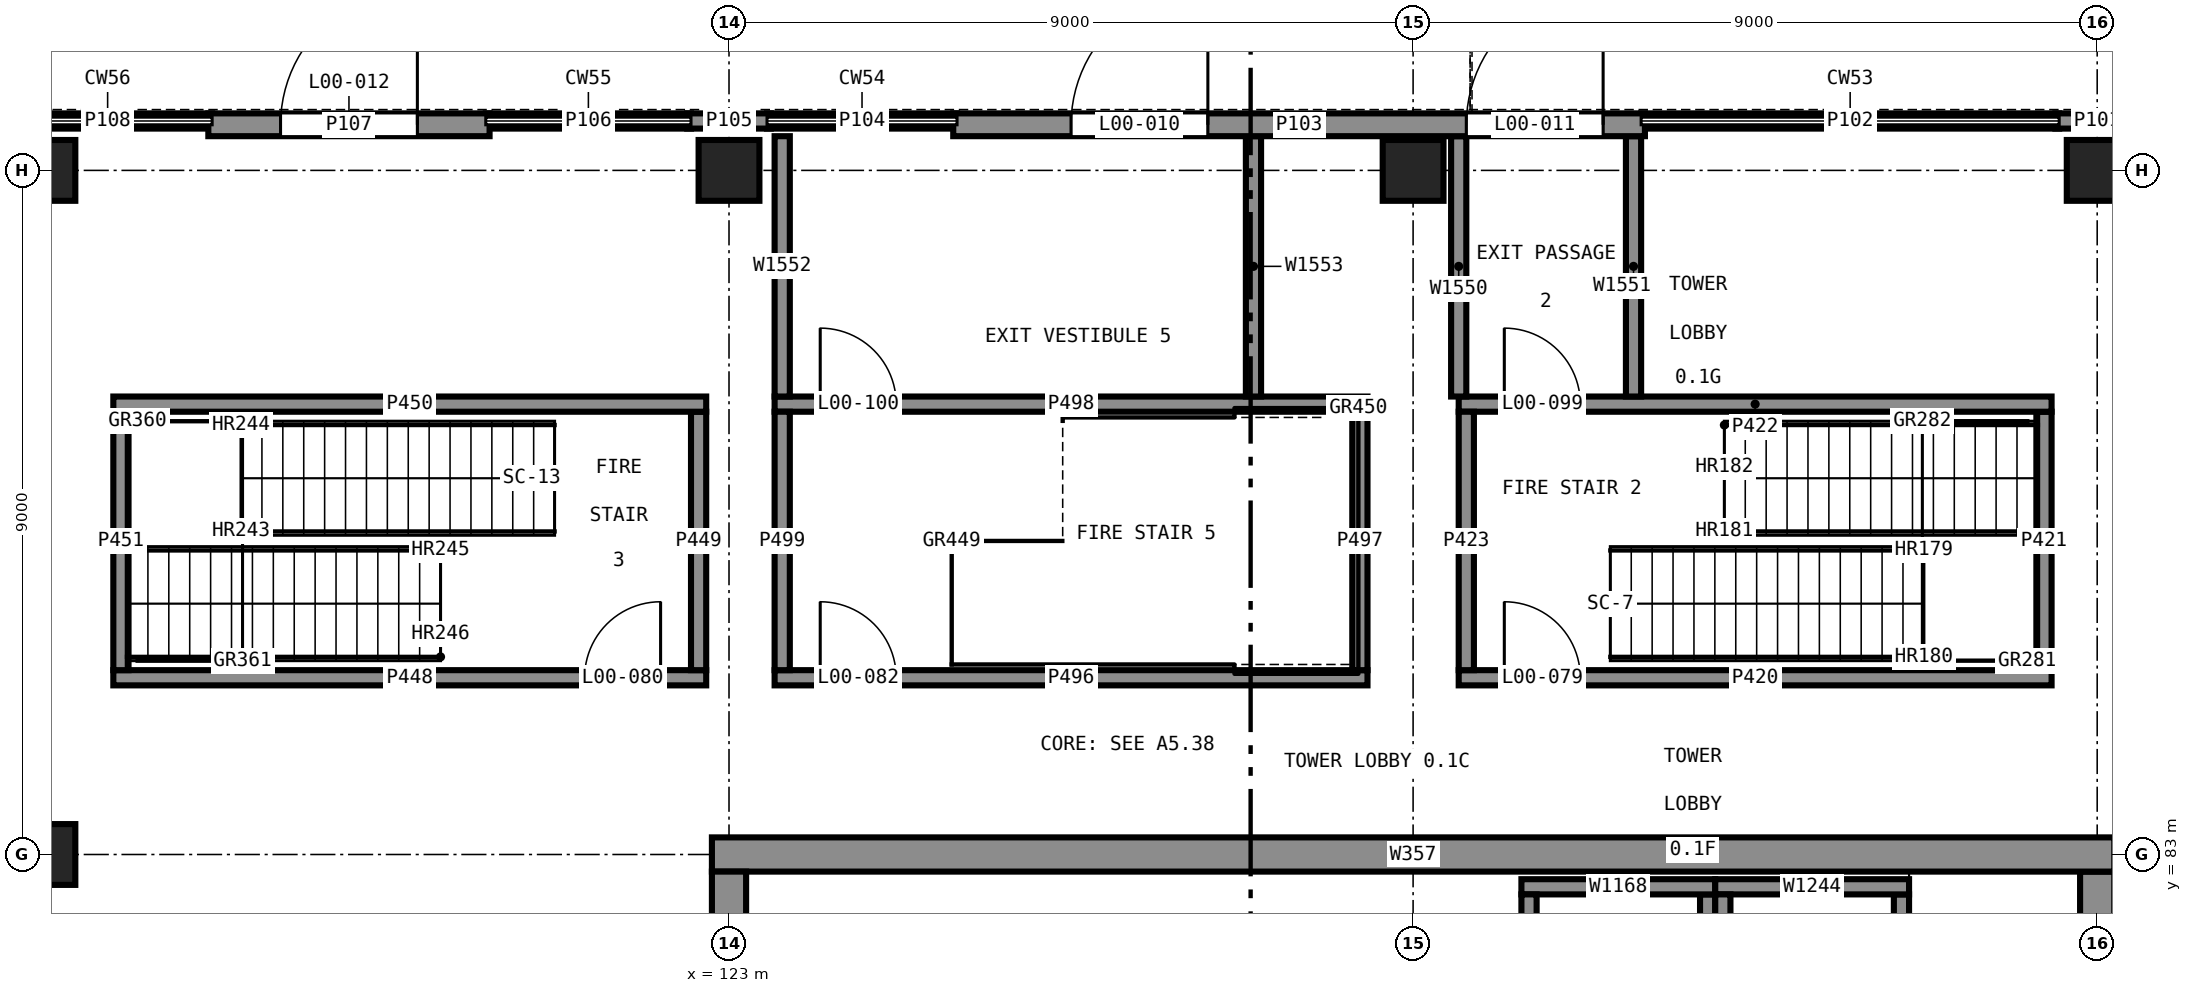
"""IFC4 building model, lengths in metres.
Left out: names, types, materials, properties, quantities, classifications, styles, units other than length and angle.
Written with IfcOpenShell. Run it as: python <this file> out.ifc"""

import sys

from ifc_helpers import new_model, si_unit, direction, frame, frame_2d, origin, origin_2d, place, context, subcontext, project, spatial, rectangle, extrude, element, fill, save


model = new_model("IFC4")
c1 = context("Model", 3, precision=1e-05, world=origin(), true_north=direction((0.0, 1.0)))
c2 = subcontext(c1, "Body", "Model", "MODEL_VIEW")
j1 = project(units=[si_unit("LENGTHUNIT", "METRE"), si_unit("PLANEANGLEUNIT", "RADIAN")], contexts=[c1])
p1 = place(None, origin())
s1 = spatial("IfcSite", under=j1, at=p1, CompositionType="ELEMENT")
p2 = place(p1, origin())
s2 = spatial("IfcBuilding", under=s1, at=p2, CompositionType="ELEMENT")
p3 = place(p2, origin())
s3 = spatial("IfcBuildingStorey", under=s2, at=p3, CompositionType="ELEMENT", Elevation=0.0)
for number, where, z_axis, x_axis in (
    (1, (114.0, 83.0, 0.0), (0.0, 0.0, 1.0), (1.0, 0.0, 0.0)),
    (2, (114.0, 92.0, 0.0), (0.0, 0.0, 1.0), (1.0, 0.0, 0.0)),
    (3, (123.0, 92.0, 0.0), (0.0, 0.0, 1.0), (1.0, 0.0, 0.0)),
    (4, (132.0, 92.0, 0.0), (0.0, 0.0, 1.0), (1.0, 0.0, 0.0)),
    (5, (141.0, 92.0, 0.0), (0.0, 0.0, 1.0), (1.0, 0.0, 0.0)),
):
    element("IfcColumn", number, at=place(p3, frame(where, z_axis=z_axis, x_axis=x_axis)), inside=s3, PredefinedType="COLUMN", context=c2, shape_type="SweptSolid", body=[
        extrude(rectangle(XDim=0.8, YDim=0.8, at=origin_2d()), origin(), (0.0, 0.0, 1.0), 5.5),
    ])
p4 = place(p3, frame((141.0, 65.225, 0.0), z_axis=(0.0, 0.0, 1.0), x_axis=(0.0, 1.0, 0.0)))
e6 = element("IfcWall", 6, at=p4, inside=s3, PredefinedType="SHEAR", context=c2, shape_type="SweptSolid", body=[
    extrude(rectangle(XDim=17.55, YDim=0.45, at=frame_2d((8.775, 0.0))), origin(), (0.0, 0.0, 1.0), 5.5),
])
p5 = place(p4, frame((4.3, 0.0, 0.0)))
e7 = element("IfcOpeningElement", 7, at=p5, cuts=e6, PredefinedType="OPENING", context=c2, shape_type="SweptSolid", body=[
    extrude(rectangle(XDim=1.2, YDim=2.1, at=frame_2d((0.6, 1.05))), frame((0.0, 0.235, 0.0), z_axis=(0.0, -1.0, 0.0), x_axis=(1.0, 0.0, 0.0)), (0.0, 0.0, 1.0), 0.47),
])
p6 = place(p4, frame((12.05, 0.0, 0.0)))
e8 = element("IfcOpeningElement", 8, at=p6, cuts=e6, PredefinedType="OPENING", context=c2, shape_type="SweptSolid", body=[
    extrude(rectangle(XDim=1.2, YDim=2.1, at=frame_2d((0.6, 1.05))), frame((0.0, 0.235, 0.0), z_axis=(0.0, -1.0, 0.0), x_axis=(1.0, 0.0, 0.0)), (0.0, 0.0, 1.0), 0.47),
])
p7 = place(p3, frame((141.225, 83.0, 0.0), z_axis=(0.0, 0.0, 1.0), x_axis=(-1.0, 0.0, 0.0)))
e9 = element("IfcWall", 9, at=p7, inside=s3, PredefinedType="SHEAR", context=c2, shape_type="SweptSolid", body=[
    extrude(rectangle(XDim=18.45, YDim=0.45, at=frame_2d((9.225, 0.0))), origin(), (0.0, 0.0, 1.0), 5.5),
])
p8 = place(p3, frame((123.0, 82.775, 0.0), z_axis=(0.0, 0.0, 1.0), x_axis=(0.0, -1.0, 0.0)))
e10 = element("IfcWall", 10, at=p8, inside=s3, PredefinedType="SHEAR", context=c2, shape_type="SweptSolid", body=[
    extrude(rectangle(XDim=17.55, YDim=0.45, at=frame_2d((8.775, 0.0))), origin(), (0.0, 0.0, 1.0), 5.5),
])
p9 = place(p8, frame((12.05, 0.0, 0.0)))
e11 = element("IfcOpeningElement", 11, at=p9, cuts=e10, PredefinedType="OPENING", context=c2, shape_type="SweptSolid", body=[
    extrude(rectangle(XDim=1.2, YDim=2.1, at=frame_2d((0.6, 1.05))), frame((0.0, 0.235, 0.0), z_axis=(0.0, -1.0, 0.0), x_axis=(1.0, 0.0, 0.0)), (0.0, 0.0, 1.0), 0.47),
])
p10 = place(p8, frame((4.3, 0.0, 0.0)))
e12 = element("IfcOpeningElement", 12, at=p10, cuts=e10, PredefinedType="OPENING", context=c2, shape_type="SweptSolid", body=[
    extrude(rectangle(XDim=1.2, YDim=2.1, at=frame_2d((0.6, 1.05))), frame((0.0, 0.235, 0.0), z_axis=(0.0, -1.0, 0.0), x_axis=(1.0, 0.0, 0.0)), (0.0, 0.0, 1.0), 0.47),
])
p11 = place(p3, frame((141.55, 92.65, 0.0), z_axis=(0.0, 0.0, 1.0), x_axis=(-1.0, 0.0, 0.0)))
e13 = element("IfcWall", 13, at=p11, inside=s3, PredefinedType="SOLIDWALL", context=c2, shape_type="SweptSolid", body=[
    extrude(rectangle(XDim=1.1, YDim=0.2, at=frame_2d((0.55, 0.0))), origin(), (0.0, 0.0, 1.0), 5.25),
])
p12 = place(p3, frame((140.5, 92.65, 0.0), z_axis=(0.0, 0.0, 1.0), x_axis=(-1.0, 0.0, 0.0)))
e14 = element("IfcWall", 14, at=p12, inside=s3, PredefinedType="SOLIDWALL", context=c2, shape_type="SweptSolid", body=[
    extrude(rectangle(XDim=5.5, YDim=0.2, at=frame_2d((2.75, 0.0))), origin(), (0.0, 0.0, 1.0), 1.2),
])
p13 = place(p3, frame((135.05, 92.6, 0.0), z_axis=(0.0, 0.0, 1.0), x_axis=(-1.0, 0.0, 0.0)))
e15 = element("IfcWall", 15, at=p13, inside=s3, PredefinedType="SOLIDWALL", context=c2, shape_type="SweptSolid", body=[
    extrude(rectangle(XDim=9.1, YDim=0.3, at=frame_2d((4.55, 0.0))), origin(), (0.0, 0.0, 1.0), 5.25),
])
p14 = place(p13, frame((5.75, 0.0, 0.0)))
e16 = element("IfcOpeningElement", 16, at=p14, cuts=e15, PredefinedType="OPENING", context=c2, shape_type="SweptSolid", body=[
    extrude(rectangle(XDim=1.8, YDim=2.4, at=frame_2d((0.9, 1.2))), frame((0.0, 0.16, 0.0), z_axis=(0.0, -1.0, 0.0), x_axis=(1.0, 0.0, 0.0)), (0.0, 0.0, 1.0), 0.32),
])
p15 = place(p13, frame((0.55, 0.0, 0.0)))
e17 = element("IfcOpeningElement", 17, at=p15, cuts=e15, PredefinedType="OPENING", context=c2, shape_type="SweptSolid", body=[
    extrude(rectangle(XDim=1.8, YDim=2.4, at=frame_2d((0.9, 1.2))), frame((0.0, 0.16, 0.0), z_axis=(0.0, -1.0, 0.0), x_axis=(1.0, 0.0, 0.0)), (0.0, 0.0, 1.0), 0.32),
])
p16 = place(p3, frame((126.0, 92.65, 0.0), z_axis=(0.0, 0.0, 1.0), x_axis=(-1.0, 0.0, 0.0)))
e18 = element("IfcWall", 18, at=p16, inside=s3, PredefinedType="SOLIDWALL", context=c2, shape_type="SweptSolid", body=[
    extrude(rectangle(XDim=2.5, YDim=0.2, at=frame_2d((1.25, 0.0))), origin(), (0.0, 0.0, 1.0), 1.2),
])
p17 = place(p3, frame((123.55, 92.65, 0.0), z_axis=(0.0, 0.0, 1.0), x_axis=(-1.0, 0.0, 0.0)))
e19 = element("IfcWall", 19, at=p17, inside=s3, PredefinedType="SOLIDWALL", context=c2, shape_type="SweptSolid", body=[
    extrude(rectangle(XDim=1.1, YDim=0.2, at=frame_2d((0.55, 0.0))), origin(), (0.0, 0.0, 1.0), 5.25),
])
p18 = place(p3, frame((122.5, 92.65, 0.0), z_axis=(0.0, 0.0, 1.0), x_axis=(-1.0, 0.0, 0.0)))
e20 = element("IfcWall", 20, at=p18, inside=s3, PredefinedType="SOLIDWALL", context=c2, shape_type="SweptSolid", body=[
    extrude(rectangle(XDim=2.7, YDim=0.2, at=frame_2d((1.35, 0.0))), origin(), (0.0, 0.0, 1.0), 1.2),
])
p19 = place(p3, frame((119.85, 92.6, 0.0), z_axis=(0.0, 0.0, 1.0), x_axis=(-1.0, 0.0, 0.0)))
e21 = element("IfcWall", 21, at=p19, inside=s3, PredefinedType="SOLIDWALL", context=c2, shape_type="SweptSolid", body=[
    extrude(rectangle(XDim=3.7, YDim=0.3, at=frame_2d((1.85, 0.0))), origin(), (0.0, 0.0, 1.0), 5.25),
])
p20 = place(p19, frame((0.95, 0.0, 0.0)))
e22 = element("IfcOpeningElement", 22, at=p20, cuts=e21, PredefinedType="OPENING", context=c2, shape_type="SweptSolid", body=[
    extrude(rectangle(XDim=1.8, YDim=2.4, at=frame_2d((0.9, 1.2))), frame((0.0, 0.16, 0.0), z_axis=(0.0, -1.0, 0.0), x_axis=(1.0, 0.0, 0.0)), (0.0, 0.0, 1.0), 0.32),
])
p21 = place(p3, frame((116.2, 92.65, 0.0), z_axis=(0.0, 0.0, 1.0), x_axis=(-1.0, 0.0, 0.0)))
e23 = element("IfcWall", 23, at=p21, inside=s3, PredefinedType="SOLIDWALL", context=c2, shape_type="SweptSolid", body=[
    extrude(rectangle(XDim=2.75, YDim=0.2, at=frame_2d((1.375, 0.0))), origin(), (0.0, 0.0, 1.0), 1.2),
])
p22 = place(p3, frame((135.875, 79.675, 0.0), z_axis=(0.0, 0.0, 1.0), x_axis=(0.0, 1.0, 0.0)))
e24 = element("IfcWall", 24, at=p22, inside=s3, PredefinedType="SHEAR", context=c2, shape_type="SweptSolid", body=[
    extrude(rectangle(XDim=2.8, YDim=0.2, at=frame_2d((1.4, 0.0))), origin(), (0.0, 0.0, 1.0), 5.5),
])
p23 = place(p3, frame((135.975, 82.575, 0.0), z_axis=(0.0, 0.0, 1.0), x_axis=(-1.0, 0.0, 0.0)))
e25 = element("IfcWall", 25, at=p23, inside=s3, PredefinedType="SHEAR", context=c2, shape_type="SweptSolid", body=[
    extrude(rectangle(XDim=2.55, YDim=0.2, at=frame_2d((1.275, 0.0))), origin(), (0.0, 0.0, 1.0), 5.5),
])
for number, where, z_axis, x_axis in (
    (26, (133.525, 82.475, 0.0), (0.0, 0.0, 1.0), (0.0, -1.0, 0.0)),
    (27, (138.425, 79.675, 0.0), (0.0, 0.0, 1.0), (0.0, 1.0, 0.0)),
):
    element("IfcWall", number, at=place(p3, frame(where, z_axis=z_axis, x_axis=x_axis)), inside=s3, PredefinedType="SHEAR", context=c2, shape_type="SweptSolid", body=[
        extrude(rectangle(XDim=2.8, YDim=0.2, at=frame_2d((1.4, 0.0))), origin(), (0.0, 0.0, 1.0), 5.5),
    ])
p24 = place(p3, frame((138.525, 82.575, 0.0), z_axis=(0.0, 0.0, 1.0), x_axis=(-1.0, 0.0, 0.0)))
e28 = element("IfcWall", 28, at=p24, inside=s3, PredefinedType="SHEAR", context=c2, shape_type="SweptSolid", body=[
    extrude(rectangle(XDim=2.55, YDim=0.2, at=frame_2d((1.275, 0.0))), origin(), (0.0, 0.0, 1.0), 5.5),
])
p25 = place(p3, frame((136.075, 82.475, 0.0), z_axis=(0.0, 0.0, 1.0), x_axis=(0.0, -1.0, 0.0)))
e29 = element("IfcWall", 29, at=p25, inside=s3, PredefinedType="SHEAR", context=c2, shape_type="SweptSolid", body=[
    extrude(rectangle(XDim=2.8, YDim=0.2, at=frame_2d((1.4, 0.0))), origin(), (0.0, 0.0, 1.0), 5.5),
])
p26 = place(p3, frame((132.6, 85.325, 0.0), z_axis=(0.0, 0.0, 1.0), x_axis=(1.0, 0.0, 0.0)))
e30 = element("IfcWall", 30, at=p26, inside=s3, PredefinedType="SHEAR", context=c2, shape_type="SweptSolid", body=[
    extrude(rectangle(XDim=7.8, YDim=0.2, at=frame_2d((3.9, 0.0))), origin(), (0.0, 0.0, 1.0), 5.25),
])
p27 = place(p26, frame((0.6, 0.0, 0.0)))
e31 = element("IfcOpeningElement", 31, at=p27, cuts=e30, PredefinedType="OPENING", context=c2, shape_type="SweptSolid", body=[
    extrude(rectangle(XDim=1.0, YDim=2.1, at=frame_2d((0.5, 1.05))), frame((0.0, 0.11, 0.0), z_axis=(0.0, -1.0, 0.0), x_axis=(1.0, 0.0, 0.0)), (0.0, 0.0, 1.0), 0.22),
])
p28 = place(p3, frame((140.3, 85.425, 0.0), z_axis=(0.0, 0.0, 1.0), x_axis=(0.0, 1.0, 0.0)))
e32 = element("IfcWall", 32, at=p28, inside=s3, PredefinedType="SHEAR", context=c2, shape_type="SweptSolid", body=[
    extrude(rectangle(XDim=3.4, YDim=0.2, at=frame_2d((1.7, 0.0))), origin(), (0.0, 0.0, 1.0), 5.25),
])
p29 = place(p3, frame((140.4, 88.925, 0.0), z_axis=(0.0, 0.0, 1.0), x_axis=(-1.0, 0.0, 0.0)))
e33 = element("IfcWall", 33, at=p29, inside=s3, PredefinedType="SHEAR", context=c2, shape_type="SweptSolid", body=[
    extrude(rectangle(XDim=7.8, YDim=0.2, at=frame_2d((3.9, 0.0))), origin(), (0.0, 0.0, 1.0), 5.25),
])
p30 = place(p29, frame((6.2, 0.0, 0.0)))
e34 = element("IfcOpeningElement", 34, at=p30, cuts=e33, PredefinedType="OPENING", context=c2, shape_type="SweptSolid", body=[
    extrude(rectangle(XDim=1.0, YDim=2.1, at=frame_2d((0.5, 1.05))), frame((0.0, 0.11, 0.0), z_axis=(0.0, -1.0, 0.0), x_axis=(1.0, 0.0, 0.0)), (0.0, 0.0, 1.0), 0.22),
])
p31 = place(p3, frame((132.7, 88.825, 0.0), z_axis=(0.0, 0.0, 1.0), x_axis=(0.0, -1.0, 0.0)))
e35 = element("IfcWall", 35, at=p31, inside=s3, PredefinedType="SHEAR", context=c2, shape_type="SweptSolid", body=[
    extrude(rectangle(XDim=3.4, YDim=0.2, at=frame_2d((1.7, 0.0))), origin(), (0.0, 0.0, 1.0), 5.25),
])
p32 = place(p3, frame((114.9, 85.325, 0.0), z_axis=(0.0, 0.0, 1.0), x_axis=(1.0, 0.0, 0.0)))
e36 = element("IfcWall", 36, at=p32, inside=s3, PredefinedType="SHEAR", context=c2, shape_type="SweptSolid", body=[
    extrude(rectangle(XDim=7.8, YDim=0.2, at=frame_2d((3.9, 0.0))), origin(), (0.0, 0.0, 1.0), 5.25),
])
p33 = place(p32, frame((6.2, 0.0, 0.0)))
e37 = element("IfcOpeningElement", 37, at=p33, cuts=e36, PredefinedType="OPENING", context=c2, shape_type="SweptSolid", body=[
    extrude(rectangle(XDim=1.0, YDim=2.1, at=frame_2d((0.5, 1.05))), frame((0.0, 0.11, 0.0), z_axis=(0.0, -1.0, 0.0), x_axis=(1.0, 0.0, 0.0)), (0.0, 0.0, 1.0), 0.22),
])
p34 = place(p3, frame((122.6, 85.425, 0.0), z_axis=(0.0, 0.0, 1.0), x_axis=(0.0, 1.0, 0.0)))
e38 = element("IfcWall", 38, at=p34, inside=s3, PredefinedType="SHEAR", context=c2, shape_type="SweptSolid", body=[
    extrude(rectangle(XDim=3.4, YDim=0.2, at=frame_2d((1.7, 0.0))), origin(), (0.0, 0.0, 1.0), 5.25),
])
p35 = place(p3, frame((122.7, 88.925, 0.0), z_axis=(0.0, 0.0, 1.0), x_axis=(-1.0, 0.0, 0.0)))
e39 = element("IfcWall", 39, at=p35, inside=s3, PredefinedType="SHEAR", context=c2, shape_type="SweptSolid", body=[
    extrude(rectangle(XDim=7.8, YDim=0.2, at=frame_2d((3.9, 0.0))), origin(), (0.0, 0.0, 1.0), 5.25),
])
p36 = place(p3, frame((115.0, 88.825, 0.0), z_axis=(0.0, 0.0, 1.0), x_axis=(0.0, -1.0, 0.0)))
e40 = element("IfcWall", 40, at=p36, inside=s3, PredefinedType="SHEAR", context=c2, shape_type="SweptSolid", body=[
    extrude(rectangle(XDim=3.4, YDim=0.2, at=frame_2d((1.7, 0.0))), origin(), (0.0, 0.0, 1.0), 5.25),
])
p37 = place(p3, frame((123.6, 85.325, 0.0), z_axis=(0.0, 0.0, 1.0), x_axis=(1.0, 0.0, 0.0)))
e41 = element("IfcWall", 41, at=p37, inside=s3, PredefinedType="SHEAR", context=c2, shape_type="SweptSolid", body=[
    extrude(rectangle(XDim=7.8, YDim=0.2, at=frame_2d((3.9, 0.0))), origin(), (0.0, 0.0, 1.0), 5.25),
])
p38 = place(p37, frame((0.6, 0.0, 0.0)))
e42 = element("IfcOpeningElement", 42, at=p38, cuts=e41, PredefinedType="OPENING", context=c2, shape_type="SweptSolid", body=[
    extrude(rectangle(XDim=1.0, YDim=2.1, at=frame_2d((0.5, 1.05))), frame((0.0, 0.11, 0.0), z_axis=(0.0, -1.0, 0.0), x_axis=(1.0, 0.0, 0.0)), (0.0, 0.0, 1.0), 0.22),
])
p39 = place(p3, frame((131.3, 85.425, 0.0), z_axis=(0.0, 0.0, 1.0), x_axis=(0.0, 1.0, 0.0)))
e43 = element("IfcWall", 43, at=p39, inside=s3, PredefinedType="SHEAR", context=c2, shape_type="SweptSolid", body=[
    extrude(rectangle(XDim=3.4, YDim=0.2, at=frame_2d((1.7, 0.0))), origin(), (0.0, 0.0, 1.0), 5.25),
])
p40 = place(p3, frame((131.4, 88.925, 0.0), z_axis=(0.0, 0.0, 1.0), x_axis=(-1.0, 0.0, 0.0)))
e44 = element("IfcWall", 44, at=p40, inside=s3, PredefinedType="SHEAR", context=c2, shape_type="SweptSolid", body=[
    extrude(rectangle(XDim=7.8, YDim=0.2, at=frame_2d((3.9, 0.0))), origin(), (0.0, 0.0, 1.0), 5.25),
])
p41 = place(p40, frame((6.2, 0.0, 0.0)))
e45 = element("IfcOpeningElement", 45, at=p41, cuts=e44, PredefinedType="OPENING", context=c2, shape_type="SweptSolid", body=[
    extrude(rectangle(XDim=1.0, YDim=2.1, at=frame_2d((0.5, 1.05))), frame((0.0, 0.11, 0.0), z_axis=(0.0, -1.0, 0.0), x_axis=(1.0, 0.0, 0.0)), (0.0, 0.0, 1.0), 0.22),
])
p42 = place(p3, frame((123.7, 88.825, 0.0), z_axis=(0.0, 0.0, 1.0), x_axis=(0.0, -1.0, 0.0)))
e46 = element("IfcWall", 46, at=p42, inside=s3, PredefinedType="SHEAR", context=c2, shape_type="SweptSolid", body=[
    extrude(rectangle(XDim=3.4, YDim=0.2, at=frame_2d((1.7, 0.0))), origin(), (0.0, 0.0, 1.0), 5.25),
])
for number, where, z_axis, x_axis in (
    (47, (132.6, 89.025, 0.0), (0.0, 0.0, 1.0), (0.0, 1.0, 0.0)),
    (48, (134.9, 89.025, 0.0), (0.0, 0.0, 1.0), (0.0, 1.0, 0.0)),
    (49, (123.7, 89.025, 0.0), (0.0, 0.0, 1.0), (0.0, 1.0, 0.0)),
    (50, (129.9, 89.025, 0.0), (0.0, 0.0, 1.0), (0.0, 1.0, 0.0)),
):
    element("IfcWall", number, at=place(p3, frame(where, z_axis=z_axis, x_axis=x_axis)), inside=s3, PredefinedType="SHEAR", context=c2, shape_type="SweptSolid", body=[
        extrude(rectangle(XDim=3.425, YDim=0.2, at=frame_2d((1.712, 0.0))), origin(), (0.0, 0.0, 1.0), 5.25),
    ])
p43 = place(p14, frame((1.8, 0.0, 0.0), z_axis=(0.0, 0.0, 1.0), x_axis=(-1.0, 0.0, 0.0)))
e51 = element("IfcDoor", 51, at=p43, inside=s3, OperationType="DOUBLE_DOOR_SINGLE_SWING", PredefinedType="DOOR", context=c2, shape_type="SweptSolid", body=[
    extrude(rectangle(XDim=1.8, YDim=2.4, at=frame_2d((0.9, 1.2))), frame((0.0, 0.025, 0.0), z_axis=(0.0, -1.0, 0.0), x_axis=(1.0, 0.0, 0.0)), (0.0, 0.0, 1.0), 0.05),
])
fill(e16, e51)
p44 = place(p15, frame((1.8, 0.0, 0.0), z_axis=(0.0, 0.0, 1.0), x_axis=(-1.0, 0.0, 0.0)))
e52 = element("IfcDoor", 52, at=p44, inside=s3, OperationType="DOUBLE_DOOR_SINGLE_SWING", PredefinedType="DOOR", context=c2, shape_type="SweptSolid", body=[
    extrude(rectangle(XDim=1.8, YDim=2.4, at=frame_2d((0.9, 1.2))), frame((0.0, 0.025, 0.0), z_axis=(0.0, -1.0, 0.0), x_axis=(1.0, 0.0, 0.0)), (0.0, 0.0, 1.0), 0.05),
])
fill(e17, e52)
p45 = place(p20, frame((1.8, 0.0, 0.0), z_axis=(0.0, 0.0, 1.0), x_axis=(-1.0, 0.0, 0.0)))
e53 = element("IfcDoor", 53, at=p45, inside=s3, OperationType="DOUBLE_DOOR_SINGLE_SWING", PredefinedType="DOOR", context=c2, shape_type="SweptSolid", body=[
    extrude(rectangle(XDim=1.8, YDim=2.4, at=frame_2d((0.9, 1.2))), frame((0.0, 0.025, 0.0), z_axis=(0.0, -1.0, 0.0), x_axis=(1.0, 0.0, 0.0)), (0.0, 0.0, 1.0), 0.05),
])
fill(e22, e53)
p46 = place(p27, origin())
e54 = element("IfcDoor", 54, at=p46, inside=s3, OperationType="SINGLE_SWING_RIGHT", PredefinedType="DOOR", context=c2, shape_type="SweptSolid", body=[
    extrude(rectangle(XDim=1.0, YDim=2.1, at=frame_2d((0.5, 1.05))), frame((0.0, 0.025, 0.0), z_axis=(0.0, -1.0, 0.0), x_axis=(1.0, 0.0, 0.0)), (0.0, 0.0, 1.0), 0.05),
])
fill(e31, e54)
p47 = place(p33, origin())
e55 = element("IfcDoor", 55, at=p47, inside=s3, OperationType="SINGLE_SWING_LEFT", PredefinedType="DOOR", context=c2, shape_type="SweptSolid", body=[
    extrude(rectangle(XDim=1.0, YDim=2.1, at=frame_2d((0.5, 1.05))), frame((0.0, 0.025, 0.0), z_axis=(0.0, -1.0, 0.0), x_axis=(1.0, 0.0, 0.0)), (0.0, 0.0, 1.0), 0.05),
])
fill(e37, e55)
p48 = place(p38, origin())
e56 = element("IfcDoor", 56, at=p48, inside=s3, OperationType="SINGLE_SWING_RIGHT", PredefinedType="DOOR", context=c2, shape_type="SweptSolid", body=[
    extrude(rectangle(XDim=1.0, YDim=2.1, at=frame_2d((0.5, 1.05))), frame((0.0, 0.025, 0.0), z_axis=(0.0, -1.0, 0.0), x_axis=(1.0, 0.0, 0.0)), (0.0, 0.0, 1.0), 0.05),
])
fill(e42, e56)
p49 = place(p30, frame((1.0, 0.0, 0.0), z_axis=(0.0, 0.0, 1.0), x_axis=(-1.0, 0.0, 0.0)))
e57 = element("IfcDoor", 57, at=p49, inside=s3, OperationType="SINGLE_SWING_RIGHT", PredefinedType="DOOR", context=c2, shape_type="SweptSolid", body=[
    extrude(rectangle(XDim=1.0, YDim=2.1, at=frame_2d((0.5, 1.05))), frame((0.0, 0.025, 0.0), z_axis=(0.0, -1.0, 0.0), x_axis=(1.0, 0.0, 0.0)), (0.0, 0.0, 1.0), 0.05),
])
fill(e34, e57)
p50 = place(p41, frame((1.0, 0.0, 0.0), z_axis=(0.0, 0.0, 1.0), x_axis=(-1.0, 0.0, 0.0)))
e58 = element("IfcDoor", 58, at=p50, inside=s3, OperationType="SINGLE_SWING_RIGHT", PredefinedType="DOOR", context=c2, shape_type="SweptSolid", body=[
    extrude(rectangle(XDim=1.0, YDim=2.1, at=frame_2d((0.5, 1.05))), frame((0.0, 0.025, 0.0), z_axis=(0.0, -1.0, 0.0), x_axis=(1.0, 0.0, 0.0)), (0.0, 0.0, 1.0), 0.05),
])
fill(e45, e58)
save(model, sys.argv[1])
